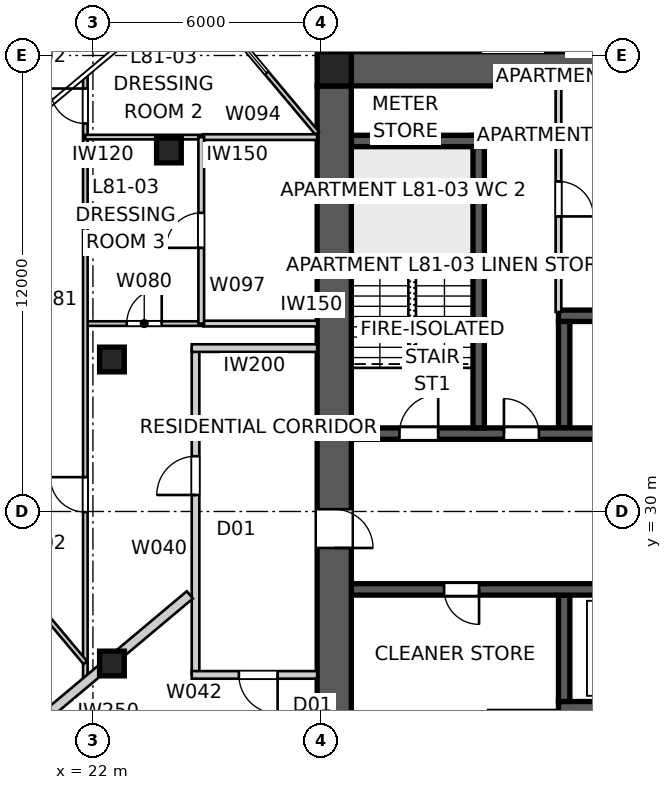
"""IFC4 building model, lengths in metres.
Left out: names, types, materials, properties, quantities, classifications, styles, units other than length and angle.
Written with IfcOpenShell. Run it as: python <this file> out.ifc"""

import sys

from ifc_helpers import new_model, si_unit, direction, frame, frame_2d, origin, origin_2d, place, context, subcontext, project, spatial, polyline, rectangle, outline, extrude, element, fill, save


model = new_model("IFC4")
c1 = context("Model", 3, precision=1e-05, world=origin(), true_north=direction((0.0, 1.0)))
c2 = subcontext(c1, "Body", "Model", "MODEL_VIEW")
j1 = project(units=[si_unit("LENGTHUNIT", "METRE"), si_unit("PLANEANGLEUNIT", "RADIAN")], contexts=[c1])
p1 = place(None, origin())
s1 = spatial("IfcSite", under=j1, at=p1, CompositionType="ELEMENT")
p2 = place(p1, origin())
s2 = spatial("IfcBuilding", under=s1, at=p2, CompositionType="ELEMENT")
p3 = place(p2, frame((0.0, 0.0, 293.0)))
s3 = spatial("IfcBuildingStorey", under=s2, at=p3, CompositionType="ELEMENT", Elevation=293.0)
p4 = place(p3, frame((28.8, 41.65, 0.0), z_axis=(0.0, 0.0, 1.0), x_axis=(1.0, 0.0, 0.0)))
e1 = element("IfcWall", 1, at=p4, inside=s3, PredefinedType="SHEAR", context=c2, shape_type="SweptSolid", body=[
    extrude(outline(polyline([(0.0, -0.45), (22.4, -0.45), (22.4, -0.025), (22.85, -0.025), (22.85, 0.025), (22.4, 0.025), (22.4, 0.45), (0.0, 0.45), (0.0, 0.025), (-0.45, 0.025), (-0.45, -0.025), (0.0, -0.025), (0.0, -0.45)])), origin(), (0.0, 0.0, 1.0), 3.4),
])
p5 = place(p3, frame((28.35, 41.2, 0.0), z_axis=(0.0, 0.0, 1.0), x_axis=(0.0, -1.0, 0.0)))
e2 = element("IfcWall", 2, at=p5, inside=s3, PredefinedType="SHEAR", context=c2, shape_type="SweptSolid", body=[
    extrude(outline(polyline([(0.0, -0.45), (22.4, -0.45), (22.4, -0.025), (22.85, -0.025), (22.85, 0.025), (22.4, 0.025), (22.4, 0.45), (0.0, 0.45), (0.0, 0.025), (-0.45, 0.025), (-0.45, -0.025), (0.0, -0.025), (0.0, -0.45)])), origin(), (0.0, 0.0, 1.0), 3.4),
])
p6 = place(p5, frame((11.14, 0.0, 0.0)))
e3 = element("IfcOpeningElement", 3, at=p6, cuts=e2, PredefinedType="OPENING", context=c2, shape_type="SweptSolid", body=[
    extrude(rectangle(XDim=1.02, YDim=2.4, at=frame_2d((0.51, 1.2))), frame((0.0, 0.46, 0.0), z_axis=(0.0, -1.0, 0.0), x_axis=(1.0, 0.0, 0.0)), (0.0, 0.0, 1.0), 0.92),
])
p7 = place(p3, frame((28.8, 32.05, 0.0), z_axis=(0.0, 0.0, 1.0), x_axis=(1.0, 0.0, 0.0)))
e4 = element("IfcWall", 4, at=p7, inside=s3, PredefinedType="SHEAR", context=c2, shape_type="SweptSolid", body=[
    extrude(rectangle(XDim=22.4, YDim=0.3, at=frame_2d((11.2, 0.0))), origin(), (0.0, 0.0, 1.0), 3.4),
])
p8 = place(p7, frame((19.04, 0.0, 0.0)))
e5 = element("IfcOpeningElement", 5, at=p8, cuts=e4, PredefinedType="OPENING", context=c2, shape_type="SweptSolid", body=[
    extrude(rectangle(XDim=0.92, YDim=2.1, at=frame_2d((0.46, 1.05))), frame((0.0, 0.16, 0.0), z_axis=(0.0, -1.0, 0.0), x_axis=(1.0, 0.0, 0.0)), (0.0, 0.0, 1.0), 0.32),
])
p9 = place(p7, frame((1.265, 0.0, 0.0)))
e6 = element("IfcOpeningElement", 6, at=p9, cuts=e4, PredefinedType="OPENING", context=c2, shape_type="SweptSolid", body=[
    extrude(rectangle(XDim=1.02, YDim=2.1, at=frame_2d((0.51, 1.05))), frame((0.0, 0.16, 0.0), z_axis=(0.0, -1.0, 0.0), x_axis=(1.0, 0.0, 0.0)), (0.0, 0.0, 1.0), 0.32),
])
p10 = place(p7, frame((4.015, 0.0, 0.0)))
e7 = element("IfcOpeningElement", 7, at=p10, cuts=e4, PredefinedType="OPENING", context=c2, shape_type="SweptSolid", body=[
    extrude(rectangle(XDim=0.92, YDim=2.1, at=frame_2d((0.46, 1.05))), frame((0.0, 0.16, 0.0), z_axis=(0.0, -1.0, 0.0), x_axis=(1.0, 0.0, 0.0)), (0.0, 0.0, 1.0), 0.32),
])
p11 = place(p7, frame((6.565, 0.0, 0.0)))
e8 = element("IfcOpeningElement", 8, at=p11, cuts=e4, PredefinedType="OPENING", context=c2, shape_type="SweptSolid", body=[
    extrude(rectangle(XDim=0.92, YDim=2.1, at=frame_2d((0.46, 1.05))), frame((0.0, 0.16, 0.0), z_axis=(0.0, -1.0, 0.0), x_axis=(1.0, 0.0, 0.0)), (0.0, 0.0, 1.0), 0.32),
])
p12 = place(p7, frame((8.89, 0.0, 0.0)))
e9 = element("IfcOpeningElement", 9, at=p12, cuts=e4, PredefinedType="OPENING", context=c2, shape_type="SweptSolid", body=[
    extrude(rectangle(XDim=0.92, YDim=2.1, at=frame_2d((0.46, 1.05))), frame((0.0, 0.16, 0.0), z_axis=(0.0, -1.0, 0.0), x_axis=(1.0, 0.0, 0.0)), (0.0, 0.0, 1.0), 0.32),
])
p13 = place(p7, frame((12.05, 0.0, 0.0)))
e10 = element("IfcOpeningElement", 10, at=p13, cuts=e4, PredefinedType="OPENING", context=c2, shape_type="SweptSolid", body=[
    extrude(rectangle(XDim=1.1, YDim=2.1, at=frame_2d((0.55, 1.05))), frame((0.0, 0.16, 0.0), z_axis=(0.0, -1.0, 0.0), x_axis=(1.0, 0.0, 0.0)), (0.0, 0.0, 1.0), 0.32),
])
p14 = place(p7, frame((14.85, 0.0, 0.0)))
e11 = element("IfcOpeningElement", 11, at=p14, cuts=e4, PredefinedType="OPENING", context=c2, shape_type="SweptSolid", body=[
    extrude(rectangle(XDim=1.1, YDim=2.1, at=frame_2d((0.55, 1.05))), frame((0.0, 0.16, 0.0), z_axis=(0.0, -1.0, 0.0), x_axis=(1.0, 0.0, 0.0)), (0.0, 0.0, 1.0), 0.32),
])
p15 = place(p3, frame((51.2, 27.95, 0.0), z_axis=(0.0, 0.0, 1.0), x_axis=(-1.0, 0.0, 0.0)))
e12 = element("IfcWall", 12, at=p15, inside=s3, PredefinedType="SHEAR", context=c2, shape_type="SweptSolid", body=[
    extrude(rectangle(XDim=22.4, YDim=0.3, at=frame_2d((11.2, 0.0))), origin(), (0.0, 0.0, 1.0), 3.4),
])
p16 = place(p15, frame((19.04, 0.0, 0.0)))
e13 = element("IfcOpeningElement", 13, at=p16, cuts=e12, PredefinedType="OPENING", context=c2, shape_type="SweptSolid", body=[
    extrude(rectangle(XDim=0.92, YDim=2.1, at=frame_2d((0.46, 1.05))), frame((0.0, 0.16, 0.0), z_axis=(0.0, -1.0, 0.0), x_axis=(1.0, 0.0, 0.0)), (0.0, 0.0, 1.0), 0.32),
])
p17 = place(p15, frame((1.265, 0.0, 0.0)))
e14 = element("IfcOpeningElement", 14, at=p17, cuts=e12, PredefinedType="OPENING", context=c2, shape_type="SweptSolid", body=[
    extrude(rectangle(XDim=1.02, YDim=2.1, at=frame_2d((0.51, 1.05))), frame((0.0, 0.16, 0.0), z_axis=(0.0, -1.0, 0.0), x_axis=(1.0, 0.0, 0.0)), (0.0, 0.0, 1.0), 0.32),
])
p18 = place(p15, frame((4.015, 0.0, 0.0)))
e15 = element("IfcOpeningElement", 15, at=p18, cuts=e12, PredefinedType="OPENING", context=c2, shape_type="SweptSolid", body=[
    extrude(rectangle(XDim=0.92, YDim=2.1, at=frame_2d((0.46, 1.05))), frame((0.0, 0.16, 0.0), z_axis=(0.0, -1.0, 0.0), x_axis=(1.0, 0.0, 0.0)), (0.0, 0.0, 1.0), 0.32),
])
p19 = place(p15, frame((8.89, 0.0, 0.0)))
e16 = element("IfcOpeningElement", 16, at=p19, cuts=e12, PredefinedType="OPENING", context=c2, shape_type="SweptSolid", body=[
    extrude(rectangle(XDim=0.92, YDim=2.1, at=frame_2d((0.46, 1.05))), frame((0.0, 0.16, 0.0), z_axis=(0.0, -1.0, 0.0), x_axis=(1.0, 0.0, 0.0)), (0.0, 0.0, 1.0), 0.32),
])
p20 = place(p15, frame((6.565, 0.0, 0.0)))
e17 = element("IfcOpeningElement", 17, at=p20, cuts=e12, PredefinedType="OPENING", context=c2, shape_type="SweptSolid", body=[
    extrude(rectangle(XDim=0.92, YDim=2.1, at=frame_2d((0.46, 1.05))), frame((0.0, 0.16, 0.0), z_axis=(0.0, -1.0, 0.0), x_axis=(1.0, 0.0, 0.0)), (0.0, 0.0, 1.0), 0.32),
])
p21 = place(p15, frame((12.05, 0.0, 0.0)))
e18 = element("IfcOpeningElement", 18, at=p21, cuts=e12, PredefinedType="OPENING", context=c2, shape_type="SweptSolid", body=[
    extrude(rectangle(XDim=1.1, YDim=2.1, at=frame_2d((0.55, 1.05))), frame((0.0, 0.16, 0.0), z_axis=(0.0, -1.0, 0.0), x_axis=(1.0, 0.0, 0.0)), (0.0, 0.0, 1.0), 0.32),
])
p22 = place(p15, frame((14.85, 0.0, 0.0)))
e19 = element("IfcOpeningElement", 19, at=p22, cuts=e12, PredefinedType="OPENING", context=c2, shape_type="SweptSolid", body=[
    extrude(rectangle(XDim=1.1, YDim=2.1, at=frame_2d((0.55, 1.05))), frame((0.0, 0.16, 0.0), z_axis=(0.0, -1.0, 0.0), x_axis=(1.0, 0.0, 0.0)), (0.0, 0.0, 1.0), 0.32),
])
for number, where, z_axis, x_axis in (
    (20, (34.25, 35.15, 0.0), (0.0, 0.0, 1.0), (1.0, 0.0, 0.0)),
    (21, (45.75, 24.85, 0.0), (0.0, 0.0, 1.0), (-1.0, 0.0, 0.0)),
):
    element("IfcWall", number, at=place(p3, frame(where, z_axis=z_axis, x_axis=x_axis)), inside=s3, PredefinedType="SHEAR", context=c2, shape_type="SweptSolid", body=[
        extrude(rectangle(XDim=11.5, YDim=0.3, at=frame_2d((5.75, 0.0))), origin(), (0.0, 0.0, 1.0), 3.4),
    ])
for number, where, z_axis, x_axis in (
    (22, (34.4, 32.2, 0.0), (0.0, 0.0, 1.0), (0.0, 1.0, 0.0)),
    (23, (34.4, 27.8, 0.0), (0.0, 0.0, 1.0), (0.0, -1.0, 0.0)),
):
    element("IfcWall", number, at=place(p3, frame(where, z_axis=z_axis, x_axis=x_axis)), inside=s3, PredefinedType="SHEAR", context=c2, shape_type="SweptSolid", body=[
        extrude(rectangle(XDim=2.8, YDim=0.3, at=frame_2d((1.4, 0.0))), origin(), (0.0, 0.0, 1.0), 3.4),
    ])
p23 = place(p3, frame((32.15, 32.2, 0.0), z_axis=(0.0, 0.0, 1.0), x_axis=(0.0, 1.0, 0.0)))
e24 = element("IfcWall", 24, at=p23, inside=s3, PredefinedType="SHEAR", context=c2, shape_type="SweptSolid", body=[
    extrude(rectangle(XDim=7.7, YDim=0.3, at=frame_2d((3.85, 0.0))), origin(), (0.0, 0.0, 1.0), 3.4),
])
p24 = place(p3, frame((28.8, 39.75, 0.0), z_axis=(0.0, 0.0, 1.0), x_axis=(1.0, 0.0, 0.0)))
e25 = element("IfcWall", 25, at=p24, inside=s3, PredefinedType="SHEAR", context=c2, shape_type="SweptSolid", body=[
    extrude(rectangle(XDim=3.5, YDim=0.3, at=frame_2d((1.75, 0.0))), origin(), (0.0, 0.0, 1.0), 3.4),
])
p25 = place(p3, frame((28.35, 41.65, 0.0), z_axis=(0.0, 0.0, 1.0), x_axis=(1.0, 0.0, 0.0)))
e26 = element("IfcColumn", 26, at=p25, inside=s3, PredefinedType="COLUMN", context=c2, shape_type="SweptSolid", body=[
    extrude(rectangle(XDim=0.9, YDim=0.9, at=origin_2d()), origin(), (0.0, 0.0, 1.0), 3.4),
])
for number, where, z_axis, x_axis in (
    (27, (24.0, 39.5, 0.0), (0.0, 0.0, 1.0), (1.0, 0.0, 0.0)),
    (28, (22.5, 34.0, 0.0), (0.0, 0.0, 1.0), (1.0, 0.0, 0.0)),
    (29, (22.5, 26.0, 0.0), (0.0, 0.0, 1.0), (1.0, 0.0, 0.0)),
):
    element("IfcColumn", number, at=place(p3, frame(where, z_axis=z_axis, x_axis=x_axis)), inside=s3, PredefinedType="COLUMN", context=c2, shape_type="SweptSolid", body=[
        extrude(rectangle(XDim=0.65, YDim=0.65, at=origin_2d()), origin(), (0.0, 0.0, 1.0), 3.4),
    ])
p26 = place(p3, frame((24.7, 25.7, 0.0), z_axis=(0.0, 0.0, 1.0), x_axis=(0.0, 1.0, 0.0)))
e30 = element("IfcWall", 30, at=p26, inside=s3, PredefinedType="PARTITIONING", context=c2, shape_type="SweptSolid", body=[
    extrude(rectangle(XDim=8.6, YDim=0.2, at=frame_2d((4.3, 0.0))), origin(), (0.0, 0.0, 1.0), 3.25),
])
p27 = place(p26, frame((4.734, 0.0, 0.0)))
e31 = element("IfcOpeningElement", 31, at=p27, cuts=e30, PredefinedType="OPENING", context=c2, shape_type="SweptSolid", body=[
    extrude(rectangle(XDim=1.02, YDim=2.34, at=frame_2d((0.51, 1.17))), frame((0.0, 0.11, 0.0), z_axis=(0.0, -1.0, 0.0), x_axis=(1.0, 0.0, 0.0)), (0.0, 0.0, 1.0), 0.22),
])
p28 = place(p3, frame((27.9, 34.3, 0.0), z_axis=(0.0, 0.0, 1.0), x_axis=(-1.0, 0.0, 0.0)))
e32 = element("IfcWall", 32, at=p28, inside=s3, PredefinedType="PARTITIONING", context=c2, shape_type="SweptSolid", body=[
    extrude(rectangle(XDim=3.3, YDim=0.2, at=frame_2d((1.65, 0.0))), origin(), (0.0, 0.0, 1.0), 3.25),
])
p29 = place(p3, frame((27.9, 25.7, 0.0), z_axis=(0.0, 0.0, 1.0), x_axis=(-1.0, 0.0, 0.0)))
e33 = element("IfcWall", 33, at=p29, inside=s3, PredefinedType="PARTITIONING", context=c2, shape_type="SweptSolid", body=[
    extrude(rectangle(XDim=3.3, YDim=0.2, at=frame_2d((1.65, 0.0))), origin(), (0.0, 0.0, 1.0), 3.25),
])
p30 = place(p29, frame((1.04, 0.0, 0.0)))
e34 = element("IfcOpeningElement", 34, at=p30, cuts=e33, PredefinedType="OPENING", context=c2, shape_type="SweptSolid", body=[
    extrude(rectangle(XDim=1.02, YDim=2.34, at=frame_2d((0.51, 1.17))), frame((0.0, 0.11, 0.0), z_axis=(0.0, -1.0, 0.0), x_axis=(1.0, 0.0, 0.0)), (0.0, 0.0, 1.0), 0.22),
])
p31 = place(p3, frame((18.993, 23.143, 0.0), z_axis=(0.0, 0.0, 1.0), x_axis=(0.766054150891, 0.642776040237, 0.0)))
e35 = element("IfcWall", 35, at=p31, inside=s3, PredefinedType="PARTITIONING", context=c2, shape_type="SweptSolid", body=[
    extrude(rectangle(XDim=7.254, YDim=0.25, at=frame_2d((3.627, 0.0))), origin(), (0.0, 0.0, 1.0), 3.25),
])
p32 = place(p3, frame((34.25, 41.2, 0.0), z_axis=(0.0, 0.0, 1.0), x_axis=(0.0, -1.0, 0.0)))
e36 = element("IfcWall", 36, at=p32, inside=s3, PredefinedType="SOLIDWALL", context=c2, shape_type="SweptSolid", body=[
    extrude(rectangle(XDim=5.95, YDim=0.15, at=frame_2d((2.975, 0.0))), origin(), (0.0, 0.0, 1.0), 3.25),
])
p33 = place(p32, frame((2.515, 0.0, 0.0)))
e37 = element("IfcOpeningElement", 37, at=p33, cuts=e36, PredefinedType="OPENING", context=c2, shape_type="SweptSolid", body=[
    extrude(rectangle(XDim=0.92, YDim=2.1, at=frame_2d((0.46, 1.05))), frame((0.0, 0.085, 0.0), z_axis=(0.0, -1.0, 0.0), x_axis=(1.0, 0.0, 0.0)), (0.0, 0.0, 1.0), 0.17),
])
p34 = place(p3, frame((32.4, 24.7, 0.0), z_axis=(0.0, 0.0, 1.0), x_axis=(1.0, 0.0, 0.0)))
e38 = element("IfcWall", 38, at=p34, inside=s3, PredefinedType="SOLIDWALL", context=c2, shape_type="SweptSolid", body=[
    extrude(rectangle(XDim=1.85, YDim=0.15, at=frame_2d((0.925, 0.0))), origin(), (0.0, 0.0, 1.0), 3.25),
])
p35 = place(p3, frame((24.9, 34.945, 0.0), z_axis=(0.0, 0.0, 1.0), x_axis=(1.0, 0.0, 0.0)))
e39 = element("IfcWall", 39, at=p35, inside=s3, PredefinedType="SOLIDWALL", context=c2, shape_type="SweptSolid", body=[
    extrude(rectangle(XDim=3.0, YDim=0.15, at=frame_2d((1.5, 0.0))), origin(), (0.0, 0.0, 1.0), 3.25),
])
p36 = place(p3, frame((21.8, 34.945, 0.0), z_axis=(0.0, 0.0, 1.0), x_axis=(1.0, 0.0, 0.0)))
e40 = element("IfcWall", 40, at=p36, inside=s3, PredefinedType="PARTITIONING", context=c2, shape_type="SweptSolid", body=[
    extrude(rectangle(XDim=3.1, YDim=0.12, at=frame_2d((1.55, 0.0))), origin(), (0.0, 0.0, 1.0), 3.25),
])
p37 = place(p36, frame((1.09, 0.0, 0.0)))
e41 = element("IfcOpeningElement", 41, at=p37, cuts=e40, PredefinedType="OPENING", context=c2, shape_type="SweptSolid", body=[
    extrude(rectangle(XDim=0.92, YDim=2.34, at=frame_2d((0.46, 1.17))), frame((0.0, 0.07, 0.0), z_axis=(0.0, -1.0, 0.0), x_axis=(1.0, 0.0, 0.0)), (0.0, 0.0, 1.0), 0.14),
])
p38 = place(p3, frame((21.8, 25.498, 0.0), z_axis=(0.0, 0.0, 1.0), x_axis=(0.0, 1.0, 0.0)))
e42 = element("IfcWall", 42, at=p38, inside=s3, PredefinedType="PARTITIONING", context=c2, shape_type="SweptSolid", body=[
    extrude(rectangle(XDim=15.939, YDim=0.12, at=frame_2d((7.969, 0.0))), origin(), (0.0, 0.0, 1.0), 3.25),
])
p39 = place(p38, frame((4.486, 0.0, 0.0)))
e43 = element("IfcOpeningElement", 43, at=p39, cuts=e42, PredefinedType="OPENING", context=c2, shape_type="SweptSolid", body=[
    extrude(rectangle(XDim=0.92, YDim=2.34, at=frame_2d((0.46, 1.17))), frame((0.0, 0.07, 0.0), z_axis=(0.0, -1.0, 0.0), x_axis=(1.0, 0.0, 0.0)), (0.0, 0.0, 1.0), 0.14),
])
p40 = place(p38, frame((14.713, 0.0, 0.0)))
e44 = element("IfcOpeningElement", 44, at=p40, cuts=e42, PredefinedType="OPENING", context=c2, shape_type="SweptSolid", body=[
    extrude(rectangle(XDim=0.92, YDim=2.34, at=frame_2d((0.46, 1.17))), frame((0.0, 0.07, 0.0), z_axis=(0.0, -1.0, 0.0), x_axis=(1.0, 0.0, 0.0)), (0.0, 0.0, 1.0), 0.14),
])
p41 = place(p3, frame((30.172, 42.1, 0.0), z_axis=(0.0, 0.0, 1.0), x_axis=(-0.532913303443, 0.846169847616, 0.0)))
e45 = element("IfcWall", 45, at=p41, inside=s3, PredefinedType="PARTITIONING", context=c2, shape_type="SweptSolid", body=[
    extrude(rectangle(XDim=4.919, YDim=0.12, at=frame_2d((2.46, 0.0))), origin(), (0.0, 0.0, 1.0), 3.25),
])
p42 = place(p41, frame((1.923, 0.0, 0.0)))
e46 = element("IfcOpeningElement", 46, at=p42, cuts=e45, PredefinedType="OPENING", context=c2, shape_type="SweptSolid", body=[
    extrude(rectangle(XDim=0.96, YDim=2.1, at=frame_2d((0.48, 1.05))), frame((0.0, 0.07, 0.0), z_axis=(0.0, -1.0, 0.0), x_axis=(1.0, 0.0, 0.0)), (0.0, 0.0, 1.0), 0.14),
])
p43 = place(p3, frame((24.65, 43.828, 0.0), z_axis=(0.0, 0.0, 1.0), x_axis=(0.64277866568, -0.766051947943, 0.0)))
e47 = element("IfcWall", 47, at=p43, inside=s3, PredefinedType="PARTITIONING", context=c2, shape_type="SweptSolid", body=[
    extrude(rectangle(XDim=5.056, YDim=0.12, at=frame_2d((2.528, 0.0))), origin(), (0.0, 0.0, 1.0), 3.25),
])
p44 = place(p43, frame((2.028, 0.0, 0.0)))
e48 = element("IfcOpeningElement", 48, at=p44, cuts=e47, PredefinedType="OPENING", context=c2, shape_type="SweptSolid", body=[
    extrude(rectangle(XDim=0.96, YDim=2.1, at=frame_2d((0.48, 1.05))), frame((0.0, 0.07, 0.0), z_axis=(0.0, -1.0, 0.0), x_axis=(1.0, 0.0, 0.0)), (0.0, 0.0, 1.0), 0.14),
])
p45 = place(p3, frame((27.9, 39.852, 0.0), z_axis=(0.0, 0.0, 1.0), x_axis=(-1.0, 0.0, 0.0)))
e49 = element("IfcWall", 49, at=p45, inside=s3, PredefinedType="SOLIDWALL", context=c2, shape_type="SweptSolid", body=[
    extrude(rectangle(XDim=3.0, YDim=0.15, at=frame_2d((1.5, 0.0))), origin(), (0.0, 0.0, 1.0), 3.25),
])
p46 = place(p3, frame((24.9, 39.852, 0.0), z_axis=(0.0, 0.0, 1.0), x_axis=(-1.0, 0.0, 0.0)))
e50 = element("IfcWall", 50, at=p46, inside=s3, PredefinedType="PARTITIONING", context=c2, shape_type="SweptSolid", body=[
    extrude(rectangle(XDim=3.1, YDim=0.12, at=frame_2d((1.55, 0.0))), origin(), (0.0, 0.0, 1.0), 3.25),
])
p47 = place(p3, frame((24.85, 34.945, 0.0), z_axis=(0.0, 0.0, 1.0), x_axis=(0.0, 1.0, 0.0)))
e51 = element("IfcWall", 51, at=p47, inside=s3, PredefinedType="SOLIDWALL", context=c2, shape_type="SweptSolid", body=[
    extrude(rectangle(XDim=4.907, YDim=0.15, at=frame_2d((2.454, 0.0))), origin(), (0.0, 0.0, 1.0), 3.25),
])
p48 = place(p47, frame((1.994, 0.0, 0.0)))
e52 = element("IfcOpeningElement", 52, at=p48, cuts=e51, PredefinedType="OPENING", context=c2, shape_type="SweptSolid", body=[
    extrude(rectangle(XDim=0.92, YDim=2.34, at=frame_2d((0.46, 1.17))), frame((0.0, 0.085, 0.0), z_axis=(0.0, -1.0, 0.0), x_axis=(1.0, 0.0, 0.0)), (0.0, 0.0, 1.0), 0.17),
])
p49 = place(p3, frame((21.8, 26.021, 0.0), z_axis=(0.0, 0.0, 1.0), x_axis=(-0.642785106342, 0.766046543668, 0.0)))
e53 = element("IfcWall", 53, at=p49, inside=s3, PredefinedType="PARTITIONING", context=c2, shape_type="SweptSolid", body=[
    extrude(rectangle(XDim=7.81, YDim=0.12, at=frame_2d((3.905, 0.0))), origin(), (0.0, 0.0, 1.0), 3.25),
])
p50 = place(p49, frame((5.465, 0.0, 0.0)))
e54 = element("IfcOpeningElement", 54, at=p50, cuts=e53, PredefinedType="OPENING", context=c2, shape_type="SweptSolid", body=[
    extrude(rectangle(XDim=0.92, YDim=2.34, at=frame_2d((0.46, 1.17))), frame((0.0, 0.07, 0.0), z_axis=(0.0, -1.0, 0.0), x_axis=(1.0, 0.0, 0.0)), (0.0, 0.0, 1.0), 0.14),
])
p51 = place(p16, origin())
e55 = element("IfcDoor", 55, at=p51, inside=s3, OperationType="SINGLE_SWING_LEFT", PredefinedType="DOOR", context=c2, shape_type="SweptSolid", body=[
    extrude(rectangle(XDim=0.92, YDim=2.1, at=frame_2d((0.46, 1.05))), frame((0.0, 0.025, 0.0), z_axis=(0.0, -1.0, 0.0), x_axis=(1.0, 0.0, 0.0)), (0.0, 0.0, 1.0), 0.05),
])
fill(e13, e55)
p52 = place(p9, origin())
e56 = element("IfcDoor", 56, at=p52, inside=s3, OperationType="SINGLE_SWING_RIGHT", PredefinedType="DOOR", context=c2, shape_type="SweptSolid", body=[
    extrude(rectangle(XDim=1.02, YDim=2.1, at=frame_2d((0.51, 1.05))), frame((0.0, 0.025, 0.0), z_axis=(0.0, -1.0, 0.0), x_axis=(1.0, 0.0, 0.0)), (0.0, 0.0, 1.0), 0.05),
])
fill(e6, e56)
p53 = place(p10, origin())
e57 = element("IfcDoor", 57, at=p53, inside=s3, OperationType="SINGLE_SWING_LEFT", PredefinedType="DOOR", context=c2, shape_type="SweptSolid", body=[
    extrude(rectangle(XDim=0.92, YDim=2.1, at=frame_2d((0.46, 1.05))), frame((0.0, 0.025, 0.0), z_axis=(0.0, -1.0, 0.0), x_axis=(1.0, 0.0, 0.0)), (0.0, 0.0, 1.0), 0.05),
])
fill(e7, e57)
p54 = place(p27, origin())
e58 = element("IfcDoor", 58, at=p54, inside=s3, OperationType="SINGLE_SWING_LEFT", PredefinedType="DOOR", context=c2, shape_type="SweptSolid", body=[
    extrude(rectangle(XDim=1.02, YDim=2.34, at=frame_2d((0.51, 1.17))), frame((0.0, 0.025, 0.0), z_axis=(0.0, -1.0, 0.0), x_axis=(1.0, 0.0, 0.0)), (0.0, 0.0, 1.0), 0.05),
])
fill(e31, e58)
p55 = place(p30, origin())
e59 = element("IfcDoor", 59, at=p55, inside=s3, OperationType="SINGLE_SWING_LEFT", PredefinedType="DOOR", context=c2, shape_type="SweptSolid", body=[
    extrude(rectangle(XDim=1.02, YDim=2.34, at=frame_2d((0.51, 1.17))), frame((0.0, 0.025, 0.0), z_axis=(0.0, -1.0, 0.0), x_axis=(1.0, 0.0, 0.0)), (0.0, 0.0, 1.0), 0.05),
])
fill(e34, e59)
p56 = place(p33, origin())
e60 = element("IfcDoor", 60, at=p56, inside=s3, OperationType="SINGLE_SWING_RIGHT", PredefinedType="DOOR", context=c2, shape_type="SweptSolid", body=[
    extrude(rectangle(XDim=0.92, YDim=2.1, at=frame_2d((0.46, 1.05))), frame((0.0, 0.025, 0.0), z_axis=(0.0, -1.0, 0.0), x_axis=(1.0, 0.0, 0.0)), (0.0, 0.0, 1.0), 0.05),
])
fill(e37, e60)
p57 = place(p39, origin())
e61 = element("IfcDoor", 61, at=p57, inside=s3, OperationType="SINGLE_SWING_RIGHT", PredefinedType="DOOR", context=c2, shape_type="SweptSolid", body=[
    extrude(rectangle(XDim=0.92, YDim=2.34, at=frame_2d((0.46, 1.17))), frame((0.0, 0.025, 0.0), z_axis=(0.0, -1.0, 0.0), x_axis=(1.0, 0.0, 0.0)), (0.0, 0.0, 1.0), 0.05),
])
fill(e43, e61)
p58 = place(p37, origin())
e62 = element("IfcDoor", 62, at=p58, inside=s3, OperationType="SINGLE_SWING_RIGHT", PredefinedType="DOOR", context=c2, shape_type="SweptSolid", body=[
    extrude(rectangle(XDim=0.92, YDim=2.34, at=frame_2d((0.46, 1.17))), frame((0.0, 0.025, 0.0), z_axis=(0.0, -1.0, 0.0), x_axis=(1.0, 0.0, 0.0)), (0.0, 0.0, 1.0), 0.05),
])
fill(e41, e62)
p59 = place(p40, origin())
e63 = element("IfcDoor", 63, at=p59, inside=s3, OperationType="SINGLE_SWING_RIGHT", PredefinedType="DOOR", context=c2, shape_type="SweptSolid", body=[
    extrude(rectangle(XDim=0.92, YDim=2.34, at=frame_2d((0.46, 1.17))), frame((0.0, 0.025, 0.0), z_axis=(0.0, -1.0, 0.0), x_axis=(1.0, 0.0, 0.0)), (0.0, 0.0, 1.0), 0.05),
])
fill(e44, e63)
p60 = place(p48, origin())
e64 = element("IfcDoor", 64, at=p60, inside=s3, OperationType="SINGLE_SWING_LEFT", PredefinedType="DOOR", context=c2, shape_type="SweptSolid", body=[
    extrude(rectangle(XDim=0.92, YDim=2.34, at=frame_2d((0.46, 1.17))), frame((0.0, 0.025, 0.0), z_axis=(0.0, -1.0, 0.0), x_axis=(1.0, 0.0, 0.0)), (0.0, 0.0, 1.0), 0.05),
])
fill(e52, e64)
p61 = place(p44, origin())
e65 = element("IfcDoor", 65, at=p61, inside=s3, OperationType="SLIDING_TO_LEFT", PredefinedType="DOOR", context=c2, shape_type="SweptSolid", body=[
    extrude(rectangle(XDim=0.96, YDim=2.1, at=frame_2d((0.48, 1.05))), frame((0.0, 0.025, 0.0), z_axis=(0.0, -1.0, 0.0), x_axis=(1.0, 0.0, 0.0)), (0.0, 0.0, 1.0), 0.05),
])
fill(e48, e65)
p62 = place(p6, origin())
e66 = element("IfcDoor", 66, at=p62, inside=s3, OperationType="SINGLE_SWING_RIGHT", PredefinedType="DOOR", context=c2, shape_type="SweptSolid", body=[
    extrude(rectangle(XDim=1.02, YDim=2.4, at=frame_2d((0.51, 1.2))), frame((0.0, 0.025, 0.0), z_axis=(0.0, -1.0, 0.0), x_axis=(1.0, 0.0, 0.0)), (0.0, 0.0, 1.0), 0.05),
])
fill(e3, e66)
save(model, sys.argv[1])
